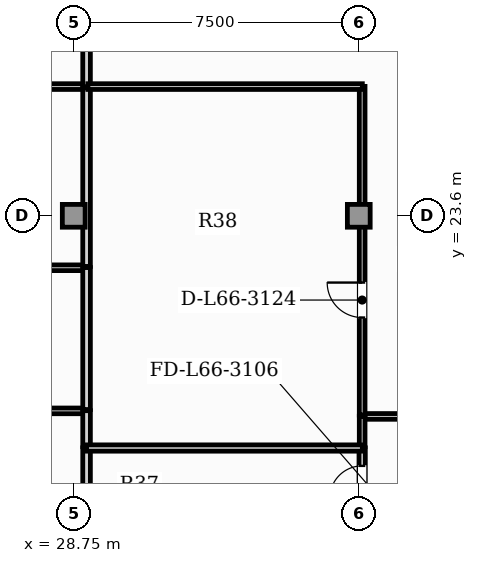
"""IFC4 building model, lengths in metres.
Left out: names, types, materials, properties, quantities, classifications, styles, units other than length and angle.
Written with IfcOpenShell. Run it as: python <this file> out.ifc"""

import sys

from ifc_helpers import new_model, si_unit, direction, frame, frame_2d, origin, origin_2d, place, context, subcontext, project, spatial, rectangle, extrude, element, fill, save


model = new_model("IFC4")
c1 = context("Model", 3, precision=1e-05, world=origin(), true_north=direction((0.0, 1.0)))
c2 = subcontext(c1, "Body", "Model", "MODEL_VIEW")
j1 = project(units=[si_unit("LENGTHUNIT", "METRE"), si_unit("PLANEANGLEUNIT", "RADIAN")], contexts=[c1])
p1 = place(None, origin())
s1 = spatial("IfcSite", under=j1, at=p1, CompositionType="ELEMENT")
p2 = place(p1, origin())
s2 = spatial("IfcBuilding", under=s1, at=p2, CompositionType="ELEMENT")
p3 = place(p2, frame((0.0, 0.0, 268.3)))
s3 = spatial("IfcBuildingStorey", under=s2, at=p3, CompositionType="ELEMENT", Elevation=268.3)
for number, where, z_axis, x_axis in (
    (1, (28.75, 23.6, 0.0), (0.0, 0.0, 1.0), (1.0, 0.0, 0.0)),
    (2, (36.25, 23.6, 0.0), (0.0, 0.0, 1.0), (1.0, 0.0, 0.0)),
):
    element("IfcColumn", number, at=place(p3, frame(where, z_axis=z_axis, x_axis=x_axis)), inside=s3, PredefinedType="COLUMN", context=c2, shape_type="SweptSolid", body=[
        extrude(rectangle(XDim=0.6, YDim=0.6, at=origin_2d()), origin(), (0.0, 0.0, 1.0), 3.85),
    ])
p4 = place(p3, frame((21.577, 27.0, 0.0), z_axis=(0.0, 0.0, 1.0), x_axis=(1.0, 0.0, 0.0)))
e3 = element("IfcWall", 3, at=p4, inside=s3, PredefinedType="PARTITIONING", context=c2, shape_type="SweptSolid", body=[
    extrude(rectangle(XDim=7.516, YDim=0.15, at=frame_2d((3.758, 0.0))), origin(), (0.0, 0.0, 1.0), 3.65),
])
p5 = place(p4, frame((3.298, 0.0, 0.0)))
e4 = element("IfcOpeningElement", 4, at=p5, cuts=e3, PredefinedType="OPENING", context=c2, shape_type="SweptSolid", body=[
    extrude(rectangle(XDim=0.92, YDim=2.1, at=frame_2d((0.46, 1.05))), frame((0.0, 0.085, 0.0), z_axis=(0.0, -1.0, 0.0), x_axis=(1.0, 0.0, 0.0)), (0.0, 0.0, 1.0), 0.17),
])
p6 = place(p3, frame((29.088, 26.995, 0.0), z_axis=(0.0, 0.0, 1.0), x_axis=(0.0, 1.0, 0.0)))
e5 = element("IfcWall", 5, at=p6, inside=s3, PredefinedType="PARTITIONING", context=c2, shape_type="SweptSolid", body=[
    extrude(rectangle(XDim=1.51, YDim=0.2, at=frame_2d((0.755, 0.0))), origin(), (0.0, 0.0, 1.0), 3.65),
])
p7 = place(p3, frame((21.577, 18.468, 0.0), z_axis=(0.0, 0.0, 1.0), x_axis=(1.0, 0.0, 0.0)))
e6 = element("IfcWall", 6, at=p7, inside=s3, PredefinedType="PARTITIONING", context=c2, shape_type="SweptSolid", body=[
    extrude(rectangle(XDim=7.516, YDim=0.15, at=frame_2d((3.758, 0.0))), origin(), (0.0, 0.0, 1.0), 3.65),
])
p8 = place(p3, frame((29.088, 15.695, 0.0), z_axis=(0.0, 0.0, 1.0), x_axis=(0.0, 1.0, 0.0)))
e7 = element("IfcWall", 7, at=p8, inside=s3, PredefinedType="PARTITIONING", context=c2, shape_type="SweptSolid", body=[
    extrude(rectangle(XDim=1.8, YDim=0.2, at=frame_2d((0.9, 0.0))), origin(), (0.0, 0.0, 1.0), 3.65),
])
p9 = place(p3, frame((29.088, 17.525, 0.0), z_axis=(0.0, 0.0, 1.0), x_axis=(0.0, 1.0, 0.0)))
e8 = element("IfcWall", 8, at=p9, inside=s3, PredefinedType="PARTITIONING", context=c2, shape_type="SweptSolid", body=[
    extrude(rectangle(XDim=0.948, YDim=0.2, at=frame_2d((0.474, 0.0))), origin(), (0.0, 0.0, 1.0), 3.65),
])
p10 = place(p3, frame((21.577, 22.233, 0.0), z_axis=(0.0, 0.0, 1.0), x_axis=(1.0, 0.0, 0.0)))
e9 = element("IfcWall", 9, at=p10, inside=s3, PredefinedType="PARTITIONING", context=c2, shape_type="SweptSolid", body=[
    extrude(rectangle(XDim=7.516, YDim=0.15, at=frame_2d((3.758, 0.0))), origin(), (0.0, 0.0, 1.0), 3.65),
])
p11 = place(p3, frame((29.088, 18.502, 0.0), z_axis=(0.0, 0.0, 1.0), x_axis=(0.0, 1.0, 0.0)))
e10 = element("IfcWall", 10, at=p11, inside=s3, PredefinedType="PARTITIONING", context=c2, shape_type="SweptSolid", body=[
    extrude(rectangle(XDim=3.736, YDim=0.2, at=frame_2d((1.868, 0.0))), origin(), (0.0, 0.0, 1.0), 3.65),
])
p12 = place(p3, frame((29.088, 22.268, 0.0), z_axis=(0.0, 0.0, 1.0), x_axis=(0.0, 1.0, 0.0)))
e11 = element("IfcWall", 11, at=p12, inside=s3, PredefinedType="PARTITIONING", context=c2, shape_type="SweptSolid", body=[
    extrude(rectangle(XDim=4.697, YDim=0.2, at=frame_2d((2.349, 0.0))), origin(), (0.0, 0.0, 1.0), 3.65),
])
p13 = place(p3, frame((36.334, 18.322, 0.0), z_axis=(0.0, 0.0, 1.0), x_axis=(1.0, 0.0, 0.0)))
e12 = element("IfcWall", 12, at=p13, inside=s3, PredefinedType="PARTITIONING", context=c2, shape_type="SweptSolid", body=[
    extrude(rectangle(XDim=4.99, YDim=0.15, at=frame_2d((2.495, 0.0))), origin(), (0.0, 0.0, 1.0), 3.65),
])
p14 = place(p13, frame((2.035, 0.0, 0.0)))
e13 = element("IfcOpeningElement", 13, at=p14, cuts=e12, PredefinedType="OPENING", context=c2, shape_type="SweptSolid", body=[
    extrude(rectangle(XDim=0.92, YDim=2.1, at=frame_2d((0.46, 1.05))), frame((0.0, 0.085, 0.0), z_axis=(0.0, -1.0, 0.0), x_axis=(1.0, 0.0, 0.0)), (0.0, 0.0, 1.0), 0.17),
])
p15 = place(p3, frame((36.339, 15.695, 0.0), z_axis=(0.0, 0.0, 1.0), x_axis=(0.0, 1.0, 0.0)))
e14 = element("IfcWall", 14, at=p15, inside=s3, PredefinedType="PLUMBINGWALL", context=c2, shape_type="SweptSolid", body=[
    extrude(rectangle(XDim=1.8, YDim=0.165, at=frame_2d((0.9, 0.0))), origin(), (0.0, 0.0, 1.0), 3.295),
])
p16 = place(p15, frame((0.475, 0.0, 0.0)))
e15 = element("IfcOpeningElement", 15, at=p16, cuts=e14, PredefinedType="OPENING", context=c2, shape_type="SweptSolid", body=[
    extrude(rectangle(XDim=0.85, YDim=2.1, at=frame_2d((0.425, 1.05))), frame((0.0, 0.093, 0.0), z_axis=(0.0, -1.0, 0.0), x_axis=(1.0, 0.0, 0.0)), (0.0, 0.0, 1.0), 0.185),
])
p17 = place(p3, frame((36.339, 17.525, 0.0), z_axis=(0.0, 0.0, 1.0), x_axis=(0.0, 1.0, 0.0)))
e16 = element("IfcWall", 16, at=p17, inside=s3, PredefinedType="PARTITIONING", context=c2, shape_type="SweptSolid", body=[
    extrude(rectangle(XDim=0.802, YDim=0.15, at=frame_2d((0.401, 0.0))), origin(), (0.0, 0.0, 1.0), 3.295),
])
p18 = place(p3, frame((36.339, 18.356, 0.0), z_axis=(0.0, 0.0, 1.0), x_axis=(0.0, 1.0, 0.0)))
e17 = element("IfcWall", 17, at=p18, inside=s3, PredefinedType="PARTITIONING", context=c2, shape_type="SweptSolid", body=[
    extrude(rectangle(XDim=8.648, YDim=0.15, at=frame_2d((4.324, 0.0))), origin(), (0.0, 0.0, 1.0), 3.295),
])
p19 = place(p18, frame((2.567, 0.0, 0.0)))
e18 = element("IfcOpeningElement", 18, at=p19, cuts=e17, PredefinedType="OPENING", context=c2, shape_type="SweptSolid", body=[
    extrude(rectangle(XDim=0.92, YDim=2.1, at=frame_2d((0.46, 1.05))), frame((0.0, 0.085, 0.0), z_axis=(0.0, -1.0, 0.0), x_axis=(1.0, 0.0, 0.0)), (0.0, 0.0, 1.0), 0.17),
])
p20 = place(p3, frame((29.123, 27.0, 0.0), z_axis=(0.0, 0.0, 1.0), x_axis=(1.0, 0.0, 0.0)))
e19 = element("IfcWall", 19, at=p20, inside=s3, PredefinedType="PARTITIONING", context=c2, shape_type="SweptSolid", body=[
    extrude(rectangle(XDim=7.221, YDim=0.15, at=frame_2d((3.611, 0.0))), origin(), (0.0, 0.0, 1.0), 3.65),
])
p21 = place(p3, frame((29.083, 17.49, 0.0), z_axis=(0.0, 0.0, 1.0), x_axis=(1.0, 0.0, 0.0)))
e20 = element("IfcWall", 20, at=p21, inside=s3, PredefinedType="PLUMBINGWALL", context=c2, shape_type="SweptSolid", body=[
    extrude(rectangle(XDim=7.261, YDim=0.165, at=frame_2d((3.631, 0.0))), origin(), (0.0, 0.0, 1.0), 3.65),
])
p22 = place(p16, origin())
e21 = element("IfcDoor", 21, at=p22, inside=s3, OperationType="SINGLE_SWING_LEFT", PredefinedType="DOOR", context=c2, shape_type="SweptSolid", body=[
    extrude(rectangle(XDim=0.85, YDim=2.1, at=frame_2d((0.425, 1.05))), frame((0.0, 0.025, 0.0), z_axis=(0.0, -1.0, 0.0), x_axis=(1.0, 0.0, 0.0)), (0.0, 0.0, 1.0), 0.05),
])
fill(e15, e21)
p23 = place(p19, origin())
e22 = element("IfcDoor", 22, at=p23, inside=s3, OperationType="SINGLE_SWING_RIGHT", PredefinedType="DOOR", context=c2, shape_type="SweptSolid", body=[
    extrude(rectangle(XDim=0.92, YDim=2.1, at=frame_2d((0.46, 1.05))), frame((0.0, 0.025, 0.0), z_axis=(0.0, -1.0, 0.0), x_axis=(1.0, 0.0, 0.0)), (0.0, 0.0, 1.0), 0.05),
])
fill(e18, e22)
save(model, sys.argv[1])
